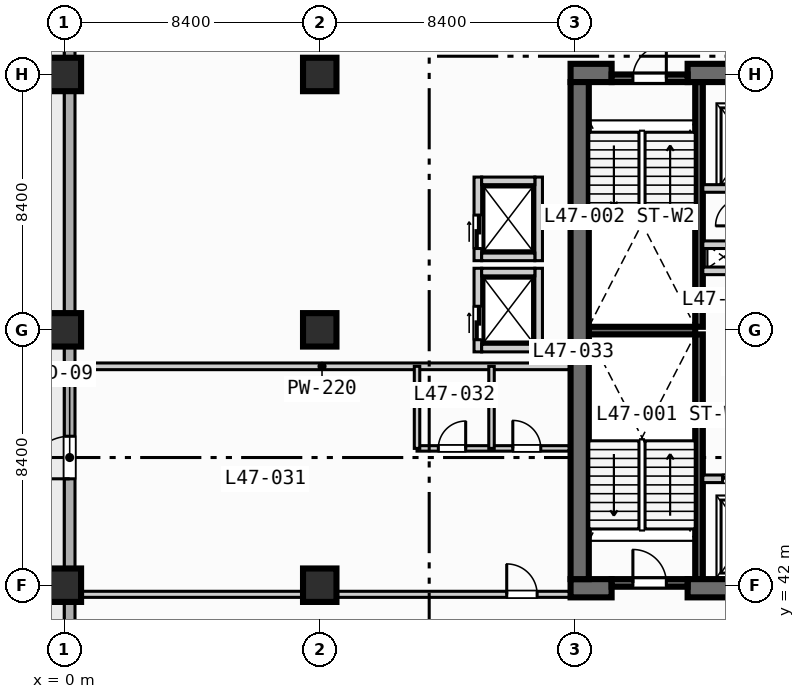
"""IFC4 building model, lengths in metres.
Left out: names, types, materials, properties, quantities, classifications, styles, units other than length and angle.
Written with IfcOpenShell. Run it as: python <this file> out.ifc"""

import sys

from ifc_helpers import new_model, si_unit, direction, frame, frame_2d, origin, origin_2d, place, context, subcontext, project, spatial, rectangle, extrude, element, fill, save


model = new_model("IFC4")
c1 = context("Model", 3, precision=1e-05, world=origin(), true_north=direction((0.0, 1.0)))
c2 = subcontext(c1, "Body", "Model", "MODEL_VIEW")
j1 = project(units=[si_unit("LENGTHUNIT", "METRE"), si_unit("PLANEANGLEUNIT", "RADIAN")], contexts=[c1])
p1 = place(None, origin())
s1 = spatial("IfcSite", under=j1, at=p1, CompositionType="ELEMENT")
p2 = place(p1, origin())
s2 = spatial("IfcBuilding", under=s1, at=p2, CompositionType="ELEMENT")
p3 = place(p2, frame((0.0, 0.0, 193.9)))
s3 = spatial("IfcBuildingStorey", under=s2, at=p3, CompositionType="ELEMENT", Elevation=193.9)
for number, where, z_axis, x_axis in (
    (1, (20.875, 42.2, 0.0), (0.0, 0.0, 1.0), (0.0, 1.0, 0.0)),
    (2, (20.875, 50.5, 0.0), (0.0, 0.0, 1.0), (0.0, 1.0, 0.0)),
):
    element("IfcWall", number, at=place(p3, frame(where, z_axis=z_axis, x_axis=x_axis)), inside=s3, PredefinedType="SOLIDWALL", context=c2, shape_type="SweptSolid", body=[
        extrude(rectangle(XDim=8.05, YDim=0.25, at=frame_2d((4.025, 0.0))), origin(), (0.0, 0.0, 1.0), 3.47),
    ])
p4 = place(p3, frame((17.25, 50.375, 0.0), z_axis=(0.0, 0.0, 1.0), x_axis=(1.0, 0.0, 0.0)))
e3 = element("IfcWall", 3, at=p4, inside=s3, PredefinedType="SOLIDWALL", context=c2, shape_type="SweptSolid", body=[
    extrude(rectangle(XDim=3.5, YDim=0.25, at=frame_2d((1.75, 0.0))), origin(), (0.0, 0.0, 1.0), 3.47),
])
p5 = place(p3, frame((16.65, 41.9, 0.0), z_axis=(0.0, 0.0, 1.0), x_axis=(1.0, 0.0, 0.0)))
e4 = element("IfcWall", 4, at=p5, inside=s3, PredefinedType="SHEAR", context=c2, shape_type="SweptSolid", body=[
    extrude(rectangle(XDim=1.35, YDim=0.6, at=frame_2d((0.675, 0.0))), origin(), (0.0, 0.0, 1.0), 3.47),
])
p6 = place(p3, frame((20.5, 41.9, 0.0), z_axis=(0.0, 0.0, 1.0), x_axis=(1.0, 0.0, 0.0)))
e5 = element("IfcWall", 5, at=p6, inside=s3, PredefinedType="SHEAR", context=c2, shape_type="SweptSolid", body=[
    extrude(rectangle(XDim=5.0, YDim=0.6, at=frame_2d((2.5, 0.0))), origin(), (0.0, 0.0, 1.0), 3.47),
])
p7 = place(p3, frame((16.65, 58.85, 0.0), z_axis=(0.0, 0.0, 1.0), x_axis=(1.0, 0.0, 0.0)))
e6 = element("IfcWall", 6, at=p7, inside=s3, PredefinedType="SHEAR", context=c2, shape_type="SweptSolid", body=[
    extrude(rectangle(XDim=1.35, YDim=0.6, at=frame_2d((0.675, 0.0))), origin(), (0.0, 0.0, 1.0), 3.47),
])
p8 = place(p3, frame((20.5, 58.85, 0.0), z_axis=(0.0, 0.0, 1.0), x_axis=(1.0, 0.0, 0.0)))
e7 = element("IfcWall", 7, at=p8, inside=s3, PredefinedType="SHEAR", context=c2, shape_type="SweptSolid", body=[
    extrude(rectangle(XDim=5.0, YDim=0.6, at=frame_2d((2.5, 0.0))), origin(), (0.0, 0.0, 1.0), 3.47),
])
p9 = place(p3, frame((16.95, 42.2, 0.0), z_axis=(0.0, 0.0, 1.0), x_axis=(0.0, 1.0, 0.0)))
e8 = element("IfcWall", 8, at=p9, inside=s3, PredefinedType="SHEAR", context=c2, shape_type="SweptSolid", body=[
    extrude(rectangle(XDim=16.35, YDim=0.6, at=frame_2d((8.175, 0.0))), origin(), (0.0, 0.0, 1.0), 3.47),
])
for number, where, z_axis, x_axis in (
    (9, (0.0, 42.0, 0.0), (0.0, 0.0, 1.0), (1.0, 0.0, 0.0)),
    (10, (0.0, 50.4, 0.0), (0.0, 0.0, 1.0), (1.0, 0.0, 0.0)),
    (11, (0.0, 58.8, 0.0), (0.0, 0.0, 1.0), (1.0, 0.0, 0.0)),
    (12, (8.4, 42.0, 0.0), (0.0, 0.0, 1.0), (1.0, 0.0, 0.0)),
    (13, (8.4, 50.4, 0.0), (0.0, 0.0, 1.0), (1.0, 0.0, 0.0)),
    (14, (8.4, 58.8, 0.0), (0.0, 0.0, 1.0), (1.0, 0.0, 0.0)),
):
    element("IfcColumn", number, at=place(p3, frame(where, z_axis=z_axis, x_axis=x_axis)), inside=s3, PredefinedType="COLUMN", context=c2, shape_type="SweptSolid", body=[
        extrude(rectangle(XDim=1.1, YDim=1.1, at=origin_2d()), origin(), (0.0, 0.0, 1.0), 3.7),
    ])
p10 = place(p3, frame((0.175, 3.175, 0.0), z_axis=(0.0, 0.0, 1.0), x_axis=(0.0, 1.0, 0.0)))
e15 = element("IfcWall", 15, at=p10, inside=s3, PredefinedType="STANDARD", context=c2, shape_type="SweptSolid", body=[
    extrude(rectangle(XDim=69.25, YDim=0.35, at=frame_2d((34.625, 0.0))), origin(), (0.0, 0.0, 1.0), 3.47),
])
p11 = place(p10, frame((42.325, 0.0, 0.0)))
e16 = element("IfcOpeningElement", 16, at=p11, cuts=e15, PredefinedType="OPENING", context=c2, shape_type="SweptSolid", body=[
    extrude(rectangle(XDim=1.4, YDim=2.2, at=frame_2d((0.7, 1.1))), frame((0.0, 0.185, 0.0), z_axis=(0.0, -1.0, 0.0), x_axis=(1.0, 0.0, 0.0)), (0.0, 0.0, 1.0), 0.37),
])
p12 = place(p10, frame((25.025, 0.0, 0.85)))
e17 = element("IfcOpeningElement", 17, at=p12, cuts=e15, PredefinedType="OPENING", context=c2, shape_type="SweptSolid", body=[
    extrude(rectangle(XDim=2.4, YDim=1.95, at=frame_2d((1.2, 0.975))), frame((0.0, 0.185, 0.0), z_axis=(0.0, -1.0, 0.0), x_axis=(1.0, 0.0, 0.0)), (0.0, 0.0, 1.0), 0.37),
])
p13 = place(p10, frame((33.725, 0.0, 0.85)))
e18 = element("IfcOpeningElement", 18, at=p13, cuts=e15, PredefinedType="OPENING", context=c2, shape_type="SweptSolid", body=[
    extrude(rectangle(XDim=1.8, YDim=1.8, at=frame_2d((0.9, 0.9))), frame((0.0, 0.185, 0.0), z_axis=(0.0, -1.0, 0.0), x_axis=(1.0, 0.0, 0.0)), (0.0, 0.0, 1.0), 0.37),
])
p14 = place(p10, frame((58.375, 0.0, 0.85)))
e19 = element("IfcOpeningElement", 19, at=p14, cuts=e15, PredefinedType="OPENING", context=c2, shape_type="SweptSolid", body=[
    extrude(rectangle(XDim=1.8, YDim=1.8, at=frame_2d((0.9, 0.9))), frame((0.0, 0.185, 0.0), z_axis=(0.0, -1.0, 0.0), x_axis=(1.0, 0.0, 0.0)), (0.0, 0.0, 1.0), 0.37),
])
p15 = place(p10, frame((64.775, 0.0, 0.85)))
e20 = element("IfcOpeningElement", 20, at=p15, cuts=e15, PredefinedType="OPENING", context=c2, shape_type="SweptSolid", body=[
    extrude(rectangle(XDim=1.8, YDim=1.8, at=frame_2d((0.9, 0.9))), frame((0.0, 0.185, 0.0), z_axis=(0.0, -1.0, 0.0), x_axis=(1.0, 0.0, 0.0)), (0.0, 0.0, 1.0), 0.37),
])
p16 = place(p3, frame((18.0, 42.075, 0.0), z_axis=(0.0, 0.0, 1.0), x_axis=(1.0, 0.0, 0.0)))
e21 = element("IfcWall", 21, at=p16, inside=s3, PredefinedType="SOLIDWALL", context=c2, shape_type="SweptSolid", body=[
    extrude(rectangle(XDim=2.5, YDim=0.25, at=frame_2d((1.25, 0.0))), origin(), (0.0, 0.0, 1.0), 3.47),
])
p17 = place(p16, frame((0.7, 0.0, 0.0)))
e22 = element("IfcOpeningElement", 22, at=p17, cuts=e21, PredefinedType="OPENING", context=c2, shape_type="SweptSolid", body=[
    extrude(rectangle(XDim=1.1, YDim=2.15, at=frame_2d((0.55, 1.075))), frame((0.0, 0.135, 0.0), z_axis=(0.0, -1.0, 0.0), x_axis=(1.0, 0.0, 0.0)), (0.0, 0.0, 1.0), 0.27),
])
p18 = place(p3, frame((18.0, 58.675, 0.0), z_axis=(0.0, 0.0, 1.0), x_axis=(1.0, 0.0, 0.0)))
e23 = element("IfcWall", 23, at=p18, inside=s3, PredefinedType="SOLIDWALL", context=c2, shape_type="SweptSolid", body=[
    extrude(rectangle(XDim=2.5, YDim=0.25, at=frame_2d((1.25, 0.0))), origin(), (0.0, 0.0, 1.0), 3.47),
])
p19 = place(p18, frame((0.7, 0.0, 0.0)))
e24 = element("IfcOpeningElement", 24, at=p19, cuts=e23, PredefinedType="OPENING", context=c2, shape_type="SweptSolid", body=[
    extrude(rectangle(XDim=1.1, YDim=2.15, at=frame_2d((0.55, 1.075))), frame((0.0, 0.135, 0.0), z_axis=(0.0, -1.0, 0.0), x_axis=(1.0, 0.0, 0.0)), (0.0, 0.0, 1.0), 0.27),
])
p20 = place(p3, frame((21.0, 45.5, 0.0), z_axis=(0.0, 0.0, 1.0), x_axis=(1.0, 0.0, 0.0)))
e25 = element("IfcWall", 25, at=p20, inside=s3, PredefinedType="SOLIDWALL", context=c2, shape_type="SweptSolid", body=[
    extrude(rectangle(XDim=4.15, YDim=0.25, at=frame_2d((2.075, 0.0))), origin(), (0.0, 0.0, 1.0), 3.47),
])
p21 = place(p20, frame((0.65, 0.0, 0.0)))
e26 = element("IfcOpeningElement", 26, at=p21, cuts=e25, PredefinedType="OPENING", context=c2, shape_type="SweptSolid", body=[
    extrude(rectangle(XDim=1.1, YDim=2.15, at=frame_2d((0.55, 1.075))), frame((0.0, 0.135, 0.0), z_axis=(0.0, -1.0, 0.0), x_axis=(1.0, 0.0, 0.0)), (0.0, 0.0, 1.0), 0.27),
])
p22 = place(p3, frame((21.0, 52.34, 0.0), z_axis=(0.0, 0.0, 1.0), x_axis=(1.0, 0.0, 0.0)))
e27 = element("IfcWall", 27, at=p22, inside=s3, PredefinedType="SOLIDWALL", context=c2, shape_type="SweptSolid", body=[
    extrude(rectangle(XDim=3.9, YDim=0.25, at=frame_2d((1.95, 0.0))), origin(), (0.0, 0.0, 1.0), 3.47),
])
p23 = place(p3, frame((21.0, 55.05, 0.0), z_axis=(0.0, 0.0, 1.0), x_axis=(1.0, 0.0, 0.0)))
e28 = element("IfcWall", 28, at=p23, inside=s3, PredefinedType="SOLIDWALL", context=c2, shape_type="SweptSolid", body=[
    extrude(rectangle(XDim=4.15, YDim=0.25, at=frame_2d((2.075, 0.0))), origin(), (0.0, 0.0, 1.0), 3.47),
])
p24 = place(p23, frame((1.85, 0.0, 0.0)))
e29 = element("IfcOpeningElement", 29, at=p24, cuts=e28, PredefinedType="OPENING", context=c2, shape_type="SweptSolid", body=[
    extrude(rectangle(XDim=1.1, YDim=2.15, at=frame_2d((0.55, 1.075))), frame((0.0, 0.135, 0.0), z_axis=(0.0, -1.0, 0.0), x_axis=(1.0, 0.0, 0.0)), (0.0, 0.0, 1.0), 0.27),
])
p25 = place(p3, frame((21.0, 53.2, 0.0), z_axis=(0.0, 0.0, 1.0), x_axis=(1.0, 0.0, 0.0)))
e30 = element("IfcWall", 30, at=p25, inside=s3, PredefinedType="SOLIDWALL", context=c2, shape_type="SweptSolid", body=[
    extrude(rectangle(XDim=1.3, YDim=0.25, at=frame_2d((0.65, 0.0))), origin(), (0.0, 0.0, 1.0), 3.47),
])
p26 = place(p3, frame((13.6, 49.675, 0.0), z_axis=(0.0, 0.0, 1.0), x_axis=(0.0, 1.0, 0.0)))
e31 = element("IfcWall", 31, at=p26, inside=s3, PredefinedType="SOLIDWALL", context=c2, shape_type="SweptSolid", body=[
    extrude(rectangle(XDim=2.75, YDim=0.25, at=frame_2d((1.375, 0.0))), origin(), (0.0, 0.0, 1.0), 3.47),
])
p27 = place(p26, frame((0.4, 0.0, 0.0)))
e32 = element("IfcOpeningElement", 32, at=p27, cuts=e31, PredefinedType="OPENING", context=c2, shape_type="SweptSolid", body=[
    extrude(rectangle(XDim=1.1, YDim=2.15, at=frame_2d((0.55, 1.075))), frame((0.0, 0.135, 0.0), z_axis=(0.0, -1.0, 0.0), x_axis=(1.0, 0.0, 0.0)), (0.0, 0.0, 1.0), 0.27),
])
p28 = place(p3, frame((15.6, 49.675, 0.0), z_axis=(0.0, 0.0, 1.0), x_axis=(0.0, 1.0, 0.0)))
e33 = element("IfcWall", 33, at=p28, inside=s3, PredefinedType="SOLIDWALL", context=c2, shape_type="SweptSolid", body=[
    extrude(rectangle(XDim=2.75, YDim=0.25, at=frame_2d((1.375, 0.0))), origin(), (0.0, 0.0, 1.0), 3.47),
])
for number, where, z_axis, x_axis in (
    (34, (13.725, 49.8, 0.0), (0.0, 0.0, 1.0), (1.0, 0.0, 0.0)),
    (35, (13.725, 52.3, 0.0), (0.0, 0.0, 1.0), (1.0, 0.0, 0.0)),
):
    element("IfcWall", number, at=place(p3, frame(where, z_axis=z_axis, x_axis=x_axis)), inside=s3, PredefinedType="SOLIDWALL", context=c2, shape_type="SweptSolid", body=[
        extrude(rectangle(XDim=1.75, YDim=0.25, at=frame_2d((0.875, 0.0))), origin(), (0.0, 0.0, 1.0), 3.47),
    ])
p29 = place(p3, frame((13.6, 52.675, 0.0), z_axis=(0.0, 0.0, 1.0), x_axis=(0.0, 1.0, 0.0)))
e36 = element("IfcWall", 36, at=p29, inside=s3, PredefinedType="SOLIDWALL", context=c2, shape_type="SweptSolid", body=[
    extrude(rectangle(XDim=2.75, YDim=0.25, at=frame_2d((1.375, 0.0))), origin(), (0.0, 0.0, 1.0), 3.47),
])
p30 = place(p29, frame((0.4, 0.0, 0.0)))
e37 = element("IfcOpeningElement", 37, at=p30, cuts=e36, PredefinedType="OPENING", context=c2, shape_type="SweptSolid", body=[
    extrude(rectangle(XDim=1.1, YDim=2.15, at=frame_2d((0.55, 1.075))), frame((0.0, 0.135, 0.0), z_axis=(0.0, -1.0, 0.0), x_axis=(1.0, 0.0, 0.0)), (0.0, 0.0, 1.0), 0.27),
])
p31 = place(p3, frame((15.6, 52.675, 0.0), z_axis=(0.0, 0.0, 1.0), x_axis=(0.0, 1.0, 0.0)))
e38 = element("IfcWall", 38, at=p31, inside=s3, PredefinedType="SOLIDWALL", context=c2, shape_type="SweptSolid", body=[
    extrude(rectangle(XDim=2.75, YDim=0.25, at=frame_2d((1.375, 0.0))), origin(), (0.0, 0.0, 1.0), 3.47),
])
for number, where, z_axis, x_axis in (
    (39, (13.725, 52.8, 0.0), (0.0, 0.0, 1.0), (1.0, 0.0, 0.0)),
    (40, (13.725, 55.3, 0.0), (0.0, 0.0, 1.0), (1.0, 0.0, 0.0)),
):
    element("IfcWall", number, at=place(p3, frame(where, z_axis=z_axis, x_axis=x_axis)), inside=s3, PredefinedType="SOLIDWALL", context=c2, shape_type="SweptSolid", body=[
        extrude(rectangle(XDim=1.75, YDim=0.25, at=frame_2d((0.875, 0.0))), origin(), (0.0, 0.0, 1.0), 3.47),
    ])
p32 = place(p3, frame((0.35, 41.7, 0.0), z_axis=(0.0, 0.0, 1.0), x_axis=(1.0, 0.0, 0.0)))
e41 = element("IfcWall", 41, at=p32, inside=s3, PredefinedType="PARTITIONING", context=c2, shape_type="SweptSolid", body=[
    extrude(rectangle(XDim=16.25, YDim=0.2, at=frame_2d((8.125, 0.0))), origin(), (0.0, 0.0, 1.0), 2.82),
])
p33 = place(p32, frame((14.2, 0.0, 0.0)))
e42 = element("IfcOpeningElement", 42, at=p33, cuts=e41, PredefinedType="OPENING", context=c2, shape_type="SweptSolid", body=[
    extrude(rectangle(XDim=1.0, YDim=2.15, at=frame_2d((0.5, 1.075))), frame((0.0, 0.11, 0.0), z_axis=(0.0, -1.0, 0.0), x_axis=(1.0, 0.0, 0.0)), (0.0, 0.0, 1.0), 0.22),
])
p34 = place(p3, frame((0.35, 49.2, 0.0), z_axis=(0.0, 0.0, 1.0), x_axis=(1.0, 0.0, 0.0)))
e43 = element("IfcWall", 43, at=p34, inside=s3, PredefinedType="PARTITIONING", context=c2, shape_type="SweptSolid", body=[
    extrude(rectangle(XDim=16.25, YDim=0.22, at=frame_2d((8.125, 0.0))), origin(), (0.0, 0.0, 1.0), 3.47),
])
p35 = place(p3, frame((11.6, 46.5, 0.0), z_axis=(0.0, 0.0, 1.0), x_axis=(1.0, 0.0, 0.0)))
e44 = element("IfcWall", 44, at=p35, inside=s3, PredefinedType="PLUMBINGWALL", context=c2, shape_type="SweptSolid", body=[
    extrude(rectangle(XDim=5.0, YDim=0.18, at=frame_2d((2.5, 0.0))), origin(), (0.0, 0.0, 1.0), 3.47),
])
p36 = place(p35, frame((0.7, 0.0, 0.0)))
e45 = element("IfcOpeningElement", 45, at=p36, cuts=e44, PredefinedType="OPENING", context=c2, shape_type="SweptSolid", body=[
    extrude(rectangle(XDim=0.9, YDim=2.1, at=frame_2d((0.45, 1.05))), frame((0.0, 0.1, 0.0), z_axis=(0.0, -1.0, 0.0), x_axis=(1.0, 0.0, 0.0)), (0.0, 0.0, 1.0), 0.2),
])
p37 = place(p35, frame((3.15, 0.0, 0.0)))
e46 = element("IfcOpeningElement", 46, at=p37, cuts=e44, PredefinedType="OPENING", context=c2, shape_type="SweptSolid", body=[
    extrude(rectangle(XDim=0.92, YDim=2.1, at=frame_2d((0.46, 1.05))), frame((0.0, 0.1, 0.0), z_axis=(0.0, -1.0, 0.0), x_axis=(1.0, 0.0, 0.0)), (0.0, 0.0, 1.0), 0.2),
])
for number, where, z_axis, x_axis in (
    (47, (11.6, 46.5, 0.0), (0.0, 0.0, 1.0), (0.0, 1.0, 0.0)),
    (48, (14.05, 46.5, 0.0), (0.0, 0.0, 1.0), (0.0, 1.0, 0.0)),
):
    element("IfcWall", number, at=place(p3, frame(where, z_axis=z_axis, x_axis=x_axis)), inside=s3, PredefinedType="PLUMBINGWALL", context=c2, shape_type="SweptSolid", body=[
        extrude(rectangle(XDim=2.7, YDim=0.18, at=frame_2d((1.35, 0.0))), origin(), (0.0, 0.0, 1.0), 3.47),
    ])
p38 = place(p11, origin())
e49 = element("IfcDoor", 49, at=p38, inside=s3, OperationType="SINGLE_SWING_LEFT", PredefinedType="DOOR", context=c2, shape_type="SweptSolid", body=[
    extrude(rectangle(XDim=1.4, YDim=2.2, at=frame_2d((0.7, 1.1))), frame((0.0, 0.025, 0.0), z_axis=(0.0, -1.0, 0.0), x_axis=(1.0, 0.0, 0.0)), (0.0, 0.0, 1.0), 0.05),
])
fill(e16, e49)
p39 = place(p17, origin())
e50 = element("IfcDoor", 50, at=p39, inside=s3, OperationType="SINGLE_SWING_LEFT", PredefinedType="DOOR", context=c2, shape_type="SweptSolid", body=[
    extrude(rectangle(XDim=1.1, YDim=2.15, at=frame_2d((0.55, 1.075))), frame((0.0, 0.025, 0.0), z_axis=(0.0, -1.0, 0.0), x_axis=(1.0, 0.0, 0.0)), (0.0, 0.0, 1.0), 0.05),
])
fill(e22, e50)
p40 = place(p19, origin())
e51 = element("IfcDoor", 51, at=p40, inside=s3, OperationType="SINGLE_SWING_RIGHT", PredefinedType="DOOR", context=c2, shape_type="SweptSolid", body=[
    extrude(rectangle(XDim=1.1, YDim=2.15, at=frame_2d((0.55, 1.075))), frame((0.0, 0.025, 0.0), z_axis=(0.0, -1.0, 0.0), x_axis=(1.0, 0.0, 0.0)), (0.0, 0.0, 1.0), 0.05),
])
fill(e24, e51)
p41 = place(p21, origin())
e52 = element("IfcDoor", 52, at=p41, inside=s3, OperationType="SLIDING_TO_LEFT", PredefinedType="DOOR", context=c2, shape_type="SweptSolid", body=[
    extrude(rectangle(XDim=1.1, YDim=2.15, at=frame_2d((0.55, 1.075))), frame((0.0, 0.025, 0.0), z_axis=(0.0, -1.0, 0.0), x_axis=(1.0, 0.0, 0.0)), (0.0, 0.0, 1.0), 0.05),
])
fill(e26, e52)
p42 = place(p27, origin())
e53 = element("IfcDoor", 53, at=p42, inside=s3, OperationType="SLIDING_TO_LEFT", PredefinedType="DOOR", context=c2, shape_type="SweptSolid", body=[
    extrude(rectangle(XDim=1.1, YDim=2.15, at=frame_2d((0.55, 1.075))), frame((0.0, 0.025, 0.0), z_axis=(0.0, -1.0, 0.0), x_axis=(1.0, 0.0, 0.0)), (0.0, 0.0, 1.0), 0.05),
])
fill(e32, e53)
p43 = place(p30, origin())
e54 = element("IfcDoor", 54, at=p43, inside=s3, OperationType="SLIDING_TO_LEFT", PredefinedType="DOOR", context=c2, shape_type="SweptSolid", body=[
    extrude(rectangle(XDim=1.1, YDim=2.15, at=frame_2d((0.55, 1.075))), frame((0.0, 0.025, 0.0), z_axis=(0.0, -1.0, 0.0), x_axis=(1.0, 0.0, 0.0)), (0.0, 0.0, 1.0), 0.05),
])
fill(e37, e54)
p44 = place(p33, origin())
e55 = element("IfcDoor", 55, at=p44, inside=s3, OperationType="SINGLE_SWING_LEFT", PredefinedType="DOOR", context=c2, shape_type="SweptSolid", body=[
    extrude(rectangle(XDim=1.0, YDim=2.15, at=frame_2d((0.5, 1.075))), frame((0.0, 0.025, 0.0), z_axis=(0.0, -1.0, 0.0), x_axis=(1.0, 0.0, 0.0)), (0.0, 0.0, 1.0), 0.05),
])
fill(e42, e55)
p45 = place(p36, origin())
e56 = element("IfcDoor", 56, at=p45, inside=s3, OperationType="SINGLE_SWING_RIGHT", PredefinedType="DOOR", context=c2, shape_type="SweptSolid", body=[
    extrude(rectangle(XDim=0.9, YDim=2.1, at=frame_2d((0.45, 1.05))), frame((0.0, 0.025, 0.0), z_axis=(0.0, -1.0, 0.0), x_axis=(1.0, 0.0, 0.0)), (0.0, 0.0, 1.0), 0.05),
])
fill(e45, e56)
p46 = place(p37, origin())
e57 = element("IfcDoor", 57, at=p46, inside=s3, OperationType="SINGLE_SWING_LEFT", PredefinedType="DOOR", context=c2, shape_type="SweptSolid", body=[
    extrude(rectangle(XDim=0.92, YDim=2.1, at=frame_2d((0.46, 1.05))), frame((0.0, 0.025, 0.0), z_axis=(0.0, -1.0, 0.0), x_axis=(1.0, 0.0, 0.0)), (0.0, 0.0, 1.0), 0.05),
])
fill(e46, e57)
save(model, sys.argv[1])
